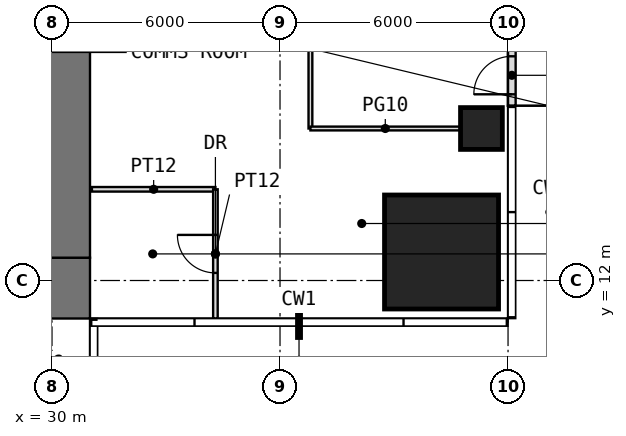
"""IFC4 building model, lengths in metres.
Left out: names, types, materials, properties, quantities, classifications, styles, units other than length and angle.
Written with IfcOpenShell. Run it as: python <this file> out.ifc"""

import sys

from ifc_helpers import new_model, si_unit, direction, frame, frame_2d, origin, origin_2d, place, context, subcontext, project, spatial, rectangle, extrude, element, fill, save


model = new_model("IFC4")
c1 = context("Model", 3, precision=1e-05, world=origin(), true_north=direction((0.0, 1.0)))
c2 = subcontext(c1, "Body", "Model", "MODEL_VIEW")
j1 = project(units=[si_unit("LENGTHUNIT", "METRE"), si_unit("PLANEANGLEUNIT", "RADIAN")], contexts=[c1])
p1 = place(None, origin())
s1 = spatial("IfcSite", under=j1, at=p1, CompositionType="ELEMENT")
p2 = place(p1, origin())
s2 = spatial("IfcBuilding", under=s1, at=p2, CompositionType="ELEMENT")
p3 = place(p2, frame((0.0, 0.0, 152.5)))
s3 = spatial("IfcBuildingStorey", under=s2, at=p3, CompositionType="ELEMENT", Elevation=152.5)
p4 = place(p3, frame((40.25, 12.75, 0.0), z_axis=(0.0, 0.0, 1.0), x_axis=(1.0, 0.0, 0.0)))
e1 = element("IfcColumn", 1, at=p4, inside=s3, PredefinedType="COLUMN", context=c2, shape_type="SweptSolid", body=[
    extrude(rectangle(XDim=3.0, YDim=3.0, at=origin_2d()), origin(), (0.0, 0.0, 1.0), 4.0),
])
p5 = place(p3, frame((41.3, 16.0, 0.0), z_axis=(0.0, 0.0, 1.0), x_axis=(1.0, 0.0, 0.0)))
e2 = element("IfcColumn", 2, at=p5, inside=s3, PredefinedType="COLUMN", context=c2, shape_type="SweptSolid", body=[
    extrude(rectangle(XDim=1.1, YDim=1.1, at=origin_2d()), origin(), (0.0, 0.0, 1.0), 4.0),
])
p6 = place(p3, frame((42.1, 16.6, 0.0), z_axis=(0.0, 0.0, 1.0), x_axis=(0.0, 1.0, 0.0)))
e3 = element("IfcWall", 3, at=p6, inside=s3, PredefinedType="USERDEFINED", context=c2, shape_type="SweptSolid", body=[
    extrude(rectangle(XDim=3.8, YDim=0.2, at=frame_2d((1.9, 0.0))), origin(), (0.0, 0.0, 1.0), 3.75),
])
p7 = place(p6, frame((0.3, 0.0, 0.0)))
e4 = element("IfcOpeningElement", 4, at=p7, cuts=e3, PredefinedType="OPENING", context=c2, shape_type="SweptSolid", body=[
    extrude(rectangle(XDim=1.0, YDim=2.4, at=frame_2d((0.5, 1.2))), frame((0.0, 0.11, 0.0), z_axis=(0.0, -1.0, 0.0), x_axis=(1.0, 0.0, 0.0)), (0.0, 0.0, 1.0), 0.22),
])
p8 = place(p6, frame((1.6, 0.0, 0.3)))
e5 = element("IfcOpeningElement", 5, at=p8, cuts=e3, PredefinedType="OPENING", context=c2, shape_type="SweptSolid", body=[
    extrude(rectangle(XDim=1.4, YDim=2.7, at=frame_2d((0.7, 1.35))), frame((0.0, 0.11, 0.0), z_axis=(0.0, -1.0, 0.0), x_axis=(1.0, 0.0, 0.0)), (0.0, 0.0, 1.0), 0.22),
])
p9 = place(p3, frame((11.0, 11.8, -0.05), z_axis=(0.0, 0.0, 1.0), x_axis=(1.0, 0.0, 0.0)))
e6 = element("IfcWall", 6, at=p9, inside=s3, PredefinedType="SHEAR", context=c2, shape_type="SweptSolid", body=[
    extrude(rectangle(XDim=20.0, YDim=1.6, at=frame_2d((10.0, 0.0))), origin(), (0.0, 0.0, 1.0), 4.0),
])
p10 = place(p9, frame((9.0, 0.0, 0.05)))
e7 = element("IfcOpeningElement", 7, at=p10, cuts=e6, PredefinedType="OPENING", context=c2, shape_type="SweptSolid", body=[
    extrude(rectangle(XDim=2.0, YDim=2.2, at=frame_2d((1.0, 1.1))), frame((0.0, 0.81, 0.0), z_axis=(0.0, -1.0, 0.0), x_axis=(1.0, 0.0, 0.0)), (0.0, 0.0, 1.0), 1.62),
])
p11 = place(p3, frame((30.2, 12.6, -0.05), z_axis=(0.0, 0.0, 1.0), x_axis=(0.0, 1.0, 0.0)))
e8 = element("IfcWall", 8, at=p11, inside=s3, PredefinedType="SHEAR", context=c2, shape_type="SweptSolid", body=[
    extrude(rectangle(XDim=16.8, YDim=1.6, at=frame_2d((8.4, 0.0))), origin(), (0.0, 0.0, 1.0), 4.0),
])
p12 = place(p11, frame((5.9, 0.0, 0.05)))
e9 = element("IfcOpeningElement", 9, at=p12, cuts=e8, PredefinedType="OPENING", context=c2, shape_type="SweptSolid", body=[
    extrude(rectangle(XDim=1.0, YDim=2.2, at=frame_2d((0.5, 1.1))), frame((0.0, 0.81, 0.0), z_axis=(0.0, -1.0, 0.0), x_axis=(1.0, 0.0, 0.0)), (0.0, 0.0, 1.0), 1.62),
])
p13 = place(p3, frame((31.05, 14.4, 0.0), z_axis=(0.0, 0.0, 1.0), x_axis=(1.0, 0.0, 0.0)))
e10 = element("IfcWall", 10, at=p13, inside=s3, PredefinedType="PARTITIONING", context=c2, shape_type="SweptSolid", body=[
    extrude(rectangle(XDim=3.25, YDim=0.12, at=frame_2d((1.625, 0.0))), origin(), (0.0, 0.0, 1.0), 3.75),
])
p14 = place(p3, frame((34.3, 11.0, 0.0), z_axis=(0.0, 0.0, 1.0), x_axis=(0.0, 1.0, 0.0)))
e11 = element("IfcWall", 11, at=p14, inside=s3, PredefinedType="PARTITIONING", context=c2, shape_type="SweptSolid", body=[
    extrude(rectangle(XDim=3.4, YDim=0.12, at=frame_2d((1.7, 0.0))), origin(), (0.0, 0.0, 1.0), 3.75),
])
p15 = place(p14, frame((1.2, 0.0, 0.0)))
e12 = element("IfcOpeningElement", 12, at=p15, cuts=e11, PredefinedType="OPENING", context=c2, shape_type="SweptSolid", body=[
    extrude(rectangle(XDim=1.0, YDim=2.2, at=frame_2d((0.5, 1.1))), frame((0.0, 0.07, 0.0), z_axis=(0.0, -1.0, 0.0), x_axis=(1.0, 0.0, 0.0)), (0.0, 0.0, 1.0), 0.14),
])
p16 = place(p3, frame((36.8, 16.0, 0.0), z_axis=(0.0, 0.0, 1.0), x_axis=(0.0, 1.0, 0.0)))
e13 = element("IfcWall", 13, at=p16, inside=s3, PredefinedType="PARTITIONING", context=c2, shape_type="SweptSolid", body=[
    extrude(rectangle(XDim=10.0, YDim=0.1, at=frame_2d((5.0, 0.0))), origin(), (0.0, 0.0, 1.0), 3.75),
])
p17 = place(p16, frame((4.1, 0.0, 0.0)))
e14 = element("IfcOpeningElement", 14, at=p17, cuts=e13, PredefinedType="OPENING", context=c2, shape_type="SweptSolid", body=[
    extrude(rectangle(XDim=1.8, YDim=2.4, at=frame_2d((0.9, 1.2))), frame((0.0, 0.06, 0.0), z_axis=(0.0, -1.0, 0.0), x_axis=(1.0, 0.0, 0.0)), (0.0, 0.0, 1.0), 0.12),
])
p18 = place(p3, frame((36.8, 16.0, 0.0), z_axis=(0.0, 0.0, 1.0), x_axis=(1.0, 0.0, 0.0)))
e15 = element("IfcWall", 15, at=p18, inside=s3, PredefinedType="PARTITIONING", context=c2, shape_type="SweptSolid", body=[
    extrude(rectangle(XDim=3.94, YDim=0.1, at=frame_2d((1.97, 0.0))), origin(), (0.0, 0.0, 1.0), 3.75),
])
p19 = place(p7, origin())
e16 = element("IfcDoor", 16, at=p19, inside=s3, OperationType="SINGLE_SWING_LEFT", PredefinedType="DOOR", context=c2, shape_type="SweptSolid", body=[
    extrude(rectangle(XDim=1.0, YDim=2.4, at=frame_2d((0.5, 1.2))), frame((0.0, 0.025, 0.0), z_axis=(0.0, -1.0, 0.0), x_axis=(1.0, 0.0, 0.0)), (0.0, 0.0, 1.0), 0.05),
])
fill(e4, e16)
p20 = place(p15, origin())
e17 = element("IfcDoor", 17, at=p20, inside=s3, OperationType="SINGLE_SWING_RIGHT", PredefinedType="DOOR", context=c2, shape_type="SweptSolid", body=[
    extrude(rectangle(XDim=1.0, YDim=2.2, at=frame_2d((0.5, 1.1))), frame((0.0, 0.025, 0.0), z_axis=(0.0, -1.0, 0.0), x_axis=(1.0, 0.0, 0.0)), (0.0, 0.0, 1.0), 0.05),
])
fill(e12, e17)
save(model, sys.argv[1])
